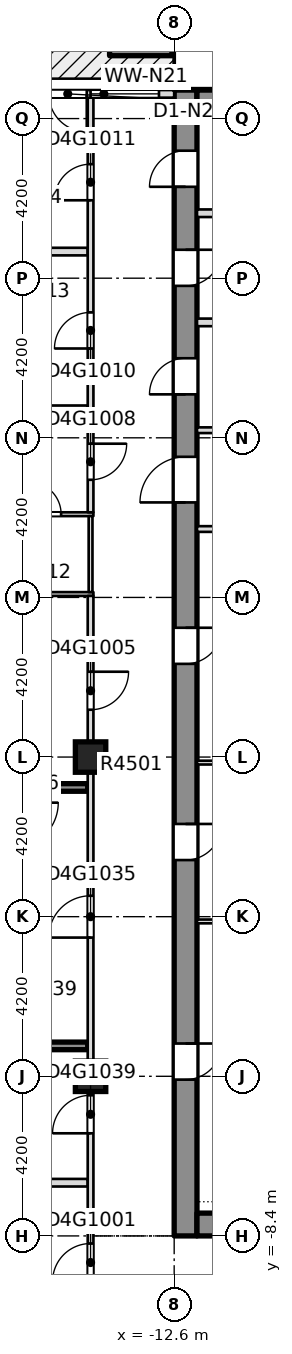
"""IFC4 building model, lengths in metres.
Left out: names, types, materials, properties, quantities, classifications, styles, units other than length and angle.
Written with IfcOpenShell. Run it as: python <this file> out.ifc"""

import sys

from ifc_helpers import new_model, si_unit, direction, frame, frame_2d, origin, origin_2d, place, context, subcontext, project, spatial, rectangle, extrude, element, fill, save


model = new_model("IFC4")
c1 = context("Model", 3, precision=1e-05, world=origin(), true_north=direction((0.0, 1.0)))
c2 = subcontext(c1, "Body", "Model", "MODEL_VIEW")
j1 = project(units=[si_unit("LENGTHUNIT", "METRE"), si_unit("PLANEANGLEUNIT", "RADIAN")], contexts=[c1])
p1 = place(None, origin())
s1 = spatial("IfcSite", under=j1, at=p1, CompositionType="ELEMENT")
p2 = place(p1, origin())
s2 = spatial("IfcBuilding", under=s1, at=p2, CompositionType="ELEMENT")
p3 = place(p2, frame((0.0, 0.0, 175.55)))
s3 = spatial("IfcBuildingStorey", under=s2, at=p3, CompositionType="ELEMENT", Elevation=175.55)
p4 = place(p3, frame((-12.3, -8.4, -0.4), z_axis=(0.0, 0.0, 1.0), x_axis=(0.0, 1.0, 0.0)))
e1 = element("IfcWall", 1, at=p4, inside=s3, PredefinedType="SHEAR", context=c2, shape_type="SweptSolid", body=[
    extrude(rectangle(XDim=30.15, YDim=0.6, at=frame_2d((15.075, 0.0))), origin(), (0.0, 0.0, 1.0), 3.45),
])
p5 = place(p4, frame((4.113, 0.0, 0.4)))
e2 = element("IfcOpeningElement", 2, at=p5, cuts=e1, PredefinedType="OPENING", context=c2, shape_type="SweptSolid", body=[
    extrude(rectangle(XDim=0.95, YDim=2.1, at=frame_2d((0.475, 1.05))), frame((0.0, 0.31, 0.0), z_axis=(0.0, -1.0, 0.0), x_axis=(1.0, 0.0, 0.0)), (0.0, 0.0, 1.0), 0.62),
])
p6 = place(p4, frame((9.89, 0.0, 0.4)))
e3 = element("IfcOpeningElement", 3, at=p6, cuts=e1, PredefinedType="OPENING", context=c2, shape_type="SweptSolid", body=[
    extrude(rectangle(XDim=0.95, YDim=2.1, at=frame_2d((0.475, 1.05))), frame((0.0, 0.31, 0.0), z_axis=(0.0, -1.0, 0.0), x_axis=(1.0, 0.0, 0.0)), (0.0, 0.0, 1.0), 0.62),
])
p7 = place(p4, frame((15.052, 0.0, 0.4)))
e4 = element("IfcOpeningElement", 4, at=p7, cuts=e1, PredefinedType="OPENING", context=c2, shape_type="SweptSolid", body=[
    extrude(rectangle(XDim=0.95, YDim=2.1, at=frame_2d((0.475, 1.05))), frame((0.0, 0.31, 0.0), z_axis=(0.0, -1.0, 0.0), x_axis=(1.0, 0.0, 0.0)), (0.0, 0.0, 1.0), 0.62),
])
p8 = place(p4, frame((22.144, 0.0, 0.4)))
e5 = element("IfcOpeningElement", 5, at=p8, cuts=e1, PredefinedType="OPENING", context=c2, shape_type="SweptSolid", body=[
    extrude(rectangle(XDim=0.95, YDim=2.1, at=frame_2d((0.475, 1.05))), frame((0.0, 0.31, 0.0), z_axis=(0.0, -1.0, 0.0), x_axis=(1.0, 0.0, 0.0)), (0.0, 0.0, 1.0), 0.62),
])
p9 = place(p4, frame((24.998, 0.0, 0.4)))
e6 = element("IfcOpeningElement", 6, at=p9, cuts=e1, PredefinedType="OPENING", context=c2, shape_type="SweptSolid", body=[
    extrude(rectangle(XDim=0.95, YDim=2.1, at=frame_2d((0.475, 1.05))), frame((0.0, 0.31, 0.0), z_axis=(0.0, -1.0, 0.0), x_axis=(1.0, 0.0, 0.0)), (0.0, 0.0, 1.0), 0.62),
])
p10 = place(p4, frame((27.605, 0.0, 0.4)))
e7 = element("IfcOpeningElement", 7, at=p10, cuts=e1, PredefinedType="OPENING", context=c2, shape_type="SweptSolid", body=[
    extrude(rectangle(XDim=0.95, YDim=2.1, at=frame_2d((0.475, 1.05))), frame((0.0, 0.31, 0.0), z_axis=(0.0, -1.0, 0.0), x_axis=(1.0, 0.0, 0.0)), (0.0, 0.0, 1.0), 0.62),
])
p11 = place(p4, frame((19.3, 0.0, 0.4)))
e8 = element("IfcOpeningElement", 8, at=p11, cuts=e1, PredefinedType="OPENING", context=c2, shape_type="SweptSolid", body=[
    extrude(rectangle(XDim=1.2, YDim=2.1, at=frame_2d((0.6, 1.05))), frame((0.0, 0.31, 0.0), z_axis=(0.0, -1.0, 0.0), x_axis=(1.0, 0.0, 0.0)), (0.0, 0.0, 1.0), 0.62),
])
p12 = place(p3, frame((-12.0, -8.1, -0.4), z_axis=(0.0, 0.0, 1.0), x_axis=(1.0, 0.0, 0.0)))
e9 = element("IfcWall", 9, at=p12, inside=s3, PredefinedType="SHEAR", context=c2, shape_type="SweptSolid", body=[
    extrude(rectangle(XDim=24.0, YDim=0.6, at=frame_2d((12.0, 0.0))), origin(), (0.0, 0.0, 1.0), 3.45),
])
p13 = place(p12, frame((7.25, 0.0, 0.4)))
e10 = element("IfcOpeningElement", 10, at=p13, cuts=e9, PredefinedType="OPENING", context=c2, shape_type="SweptSolid", body=[
    extrude(rectangle(XDim=1.8, YDim=2.1, at=frame_2d((0.9, 1.05))), frame((0.0, 0.31, 0.0), z_axis=(0.0, -1.0, 0.0), x_axis=(1.0, 0.0, 0.0)), (0.0, 0.0, 1.0), 0.62),
])
p14 = place(p12, frame((14.95, 0.0, 0.4)))
e11 = element("IfcOpeningElement", 11, at=p14, cuts=e9, PredefinedType="OPENING", context=c2, shape_type="SweptSolid", body=[
    extrude(rectangle(XDim=1.8, YDim=2.1, at=frame_2d((0.9, 1.05))), frame((0.0, 0.31, 0.0), z_axis=(0.0, -1.0, 0.0), x_axis=(1.0, 0.0, 0.0)), (0.0, 0.0, 1.0), 0.62),
])
p15 = place(p3, frame((-12.0, 21.45, -0.4), z_axis=(0.0, 0.0, 1.0), x_axis=(1.0, 0.0, 0.0)))
e12 = element("IfcWall", 12, at=p15, inside=s3, PredefinedType="SHEAR", context=c2, shape_type="SweptSolid", body=[
    extrude(rectangle(XDim=24.0, YDim=0.6, at=frame_2d((12.0, 0.0))), origin(), (0.0, 0.0, 1.0), 3.45),
])
for number, where, z_axis, x_axis in (
    (13, (-14.8, -4.2, -0.4), (0.0, 0.0, 1.0), (1.0, 0.0, 0.0)),
    (14, (-14.8, 4.2, -0.4), (0.0, 0.0, 1.0), (1.0, 0.0, 0.0)),
):
    element("IfcColumn", number, at=place(p3, frame(where, z_axis=z_axis, x_axis=x_axis)), inside=s3, PredefinedType="COLUMN", context=c2, shape_type="SweptSolid", body=[
        extrude(rectangle(XDim=0.8, YDim=0.8, at=origin_2d()), origin(), (0.0, 0.0, 1.0), 3.45),
    ])
p16 = place(p3, frame((-25.75, -7.0, 0.0), z_axis=(0.0, 0.0, 1.0), x_axis=(1.0, 0.0, 0.0)))
e15 = element("IfcWall", 15, at=p16, inside=s3, PredefinedType="PARTITIONING", context=c2, shape_type="SweptSolid", body=[
    extrude(rectangle(XDim=10.875, YDim=0.2, at=frame_2d((5.438, 0.0))), origin(), (0.0, 0.0, 1.0), 3.05),
])
p17 = place(p3, frame((-20.4, -3.4, 0.0), z_axis=(0.0, 0.0, 1.0), x_axis=(1.0, 0.0, 0.0)))
e16 = element("IfcWall", 16, at=p17, inside=s3, PredefinedType="SOLIDWALL", context=c2, shape_type="SweptSolid", body=[
    extrude(rectangle(XDim=5.525, YDim=0.2, at=frame_2d((2.762, 0.0))), origin(), (0.0, 0.0, 1.0), 3.05),
])
p18 = place(p3, frame((-20.45, 3.4, 0.0), z_axis=(0.0, 0.0, 1.0), x_axis=(1.0, 0.0, 0.0)))
e17 = element("IfcWall", 17, at=p18, inside=s3, PredefinedType="SOLIDWALL", context=c2, shape_type="SweptSolid", body=[
    extrude(rectangle(XDim=5.575, YDim=0.2, at=frame_2d((2.788, 0.0))), origin(), (0.0, 0.0, 1.0), 3.05),
])
p19 = place(p3, frame((-17.25, 8.49, 0.0), z_axis=(0.0, 0.0, 1.0), x_axis=(1.0, 0.0, 0.0)))
e18 = element("IfcWall", 18, at=p19, inside=s3, PredefinedType="PARTITIONING", context=c2, shape_type="SweptSolid", body=[
    extrude(rectangle(XDim=2.525, YDim=0.1, at=frame_2d((1.262, 0.0))), origin(), (0.0, 0.0, 1.0), 3.05),
])
p20 = place(p3, frame((-17.25, 10.59, 0.0), z_axis=(0.0, 0.0, 1.0), x_axis=(1.0, 0.0, 0.0)))
e19 = element("IfcWall", 19, at=p20, inside=s3, PredefinedType="PARTITIONING", context=c2, shape_type="SweptSolid", body=[
    extrude(rectangle(XDim=2.525, YDim=0.1, at=frame_2d((1.262, 0.0))), origin(), (0.0, 0.0, 1.0), 3.05),
])
p21 = place(p20, frame((0.825, 0.0, 0.0)))
e20 = element("IfcOpeningElement", 20, at=p21, cuts=e19, PredefinedType="OPENING", context=c2, shape_type="SweptSolid", body=[
    extrude(rectangle(XDim=0.85, YDim=2.1, at=frame_2d((0.425, 1.05))), frame((0.0, 0.06, 0.0), z_axis=(0.0, -1.0, 0.0), x_axis=(1.0, 0.0, 0.0)), (0.0, 0.0, 1.0), 0.12),
])
for number, where, z_axis, x_axis in (
    (21, (-17.35, 13.35, 0.0), (0.0, 0.0, 1.0), (1.0, 0.0, 0.0)),
    (22, (-17.35, 17.5, 0.0), (0.0, 0.0, 1.0), (1.0, 0.0, 0.0)),
):
    element("IfcWall", number, at=place(p3, frame(where, z_axis=z_axis, x_axis=x_axis)), inside=s3, PredefinedType="PARTITIONING", context=c2, shape_type="SweptSolid", body=[
        extrude(rectangle(XDim=2.475, YDim=0.2, at=frame_2d((1.238, 0.0))), origin(), (0.0, 0.0, 1.0), 3.05),
    ])
p22 = place(p3, frame((-14.8, -10.525, 0.0), z_axis=(0.0, 0.0, 1.0), x_axis=(0.0, 1.0, 0.0)))
e23 = element("IfcWall", 23, at=p22, inside=s3, PredefinedType="PARTITIONING", context=c2, shape_type="SweptSolid", body=[
    extrude(rectangle(XDim=18.965, YDim=0.15, at=frame_2d((9.482, 0.0))), origin(), (0.0, 0.0, 1.0), 3.05),
])
p23 = place(p22, frame((0.925, 0.0, 0.0)))
e24 = element("IfcOpeningElement", 24, at=p23, cuts=e23, PredefinedType="OPENING", context=c2, shape_type="SweptSolid", body=[
    extrude(rectangle(XDim=1.0, YDim=2.1, at=frame_2d((0.5, 1.05))), frame((0.0, 0.085, 0.0), z_axis=(0.0, -1.0, 0.0), x_axis=(1.0, 0.0, 0.0)), (0.0, 0.0, 1.0), 0.17),
])
p24 = place(p22, frame((15.97, 0.0, 0.0)))
e25 = element("IfcOpeningElement", 25, at=p24, cuts=e23, PredefinedType="OPENING", context=c2, shape_type="SweptSolid", body=[
    extrude(rectangle(XDim=1.0, YDim=2.1, at=frame_2d((0.5, 1.05))), frame((0.0, 0.085, 0.0), z_axis=(0.0, -1.0, 0.0), x_axis=(1.0, 0.0, 0.0)), (0.0, 0.0, 1.0), 0.17),
])
p25 = place(p22, frame((9.975, 0.0, 0.0)))
e26 = element("IfcOpeningElement", 26, at=p25, cuts=e23, PredefinedType="OPENING", context=c2, shape_type="SweptSolid", body=[
    extrude(rectangle(XDim=1.1, YDim=2.1, at=frame_2d((0.55, 1.05))), frame((0.0, 0.085, 0.0), z_axis=(0.0, -1.0, 0.0), x_axis=(1.0, 0.0, 0.0)), (0.0, 0.0, 1.0), 0.17),
])
p26 = place(p22, frame((4.825, 0.0, 0.0)))
e27 = element("IfcOpeningElement", 27, at=p26, cuts=e23, PredefinedType="OPENING", context=c2, shape_type="SweptSolid", body=[
    extrude(rectangle(XDim=1.0, YDim=2.1, at=frame_2d((0.5, 1.05))), frame((0.0, 0.085, 0.0), z_axis=(0.0, -1.0, 0.0), x_axis=(1.0, 0.0, 0.0)), (0.0, 0.0, 1.0), 0.17),
])
p27 = place(p3, frame((-14.8, 8.54, 0.0), z_axis=(0.0, 0.0, 1.0), x_axis=(0.0, 1.0, 0.0)))
e28 = element("IfcWall", 28, at=p27, inside=s3, PredefinedType="PARTITIONING", context=c2, shape_type="SweptSolid", body=[
    extrude(rectangle(XDim=2.0, YDim=0.1, at=frame_2d((1.0, 0.0))), origin(), (0.0, 0.0, 1.0), 3.05),
])
p28 = place(p3, frame((-14.8, 10.64, 0.0), z_axis=(0.0, 0.0, 1.0), x_axis=(0.0, 1.0, 0.0)))
e29 = element("IfcWall", 29, at=p28, inside=s3, PredefinedType="PARTITIONING", context=c2, shape_type="SweptSolid", body=[
    extrude(rectangle(XDim=10.91, YDim=0.15, at=frame_2d((5.455, 0.0))), origin(), (0.0, 0.0, 1.0), 3.05),
])
p29 = place(p28, frame((0.855, 0.0, 0.0)))
e30 = element("IfcOpeningElement", 30, at=p29, cuts=e29, PredefinedType="OPENING", context=c2, shape_type="SweptSolid", body=[
    extrude(rectangle(XDim=0.95, YDim=2.1, at=frame_2d((0.475, 1.05))), frame((0.0, 0.085, 0.0), z_axis=(0.0, -1.0, 0.0), x_axis=(1.0, 0.0, 0.0)), (0.0, 0.0, 1.0), 0.17),
])
p30 = place(p28, frame((4.31, 0.0, 0.0)))
e31 = element("IfcOpeningElement", 31, at=p30, cuts=e29, PredefinedType="OPENING", context=c2, shape_type="SweptSolid", body=[
    extrude(rectangle(XDim=0.95, YDim=2.1, at=frame_2d((0.475, 1.05))), frame((0.0, 0.085, 0.0), z_axis=(0.0, -1.0, 0.0), x_axis=(1.0, 0.0, 0.0)), (0.0, 0.0, 1.0), 0.17),
])
p31 = place(p28, frame((8.21, 0.0, 0.0)))
e32 = element("IfcOpeningElement", 32, at=p31, cuts=e29, PredefinedType="OPENING", context=c2, shape_type="SweptSolid", body=[
    extrude(rectangle(XDim=0.95, YDim=2.1, at=frame_2d((0.475, 1.05))), frame((0.0, 0.085, 0.0), z_axis=(0.0, -1.0, 0.0), x_axis=(1.0, 0.0, 0.0)), (0.0, 0.0, 1.0), 0.17),
])
p32 = place(p3, frame((-12.6, 21.65, 0.0), z_axis=(0.0, 0.0, 1.0), x_axis=(-1.0, 0.0, 0.0)))
e33 = element("IfcWall", 33, at=p32, inside=s3, PredefinedType="STANDARD", context=c2, shape_type="SweptSolid", body=[
    extrude(rectangle(XDim=3.7, YDim=0.2, at=frame_2d((1.85, 0.0))), origin(), (0.0, 0.0, 1.0), 3.05),
])
p33 = place(p32, frame((0.4, 0.0, 0.2)))
e34 = element("IfcOpeningElement", 34, at=p33, cuts=e33, PredefinedType="OPENING", context=c2, shape_type="SweptSolid", body=[
    extrude(rectangle(XDim=1.8, YDim=2.65, at=frame_2d((0.9, 1.325))), frame((0.0, 0.11, 0.0), z_axis=(0.0, -1.0, 0.0), x_axis=(1.0, 0.0, 0.0)), (0.0, 0.0, 1.0), 0.22),
])
p34 = place(p32, frame((2.3, 0.0, 0.0)))
e35 = element("IfcOpeningElement", 35, at=p34, cuts=e33, PredefinedType="OPENING", context=c2, shape_type="SweptSolid", body=[
    extrude(rectangle(XDim=1.0, YDim=2.4, at=frame_2d((0.5, 1.2))), frame((0.0, 0.11, 0.0), z_axis=(0.0, -1.0, 0.0), x_axis=(1.0, 0.0, 0.0)), (0.0, 0.0, 1.0), 0.22),
])
p35 = place(p3, frame((-12.66, 22.954, -0.04), z_axis=(0.0, 0.0, 1.0), x_axis=(-1.0, 0.0, 0.0)))
e36 = element("IfcWall", 36, at=p35, inside=s3, PredefinedType="USERDEFINED", context=c2, shape_type="SweptSolid", body=[
    extrude(rectangle(XDim=1.64, YDim=0.6, at=frame_2d((0.82, 0.0))), origin(), (0.0, 0.0, 1.0), 1.2),
])
for number, where, z_axis, x_axis in (
    (37, (-11.999, -0.125, 0.0), (0.0, 0.0, 1.0), (1.0, 0.0, 0.0)),
    (38, (-11.999, 4.054, 0.0), (0.0, 0.0, 1.0), (1.0, 0.0, 0.0)),
):
    element("IfcWall", number, at=place(p3, frame(where, z_axis=z_axis, x_axis=x_axis)), inside=s3, PredefinedType="PARTITIONING", context=c2, shape_type="SweptSolid", body=[
        extrude(rectangle(XDim=3.298, YDim=0.1, at=frame_2d((1.649, 0.0))), origin(), (0.0, 0.0, 1.0), 3.05),
    ])
for number, where, z_axis, x_axis in (
    (39, (-11.999, 10.2, 0.0), (0.0, 0.0, 1.0), (1.0, 0.0, 0.0)),
    (40, (-11.999, 12.8, 0.0), (0.0, 0.0, 1.0), (1.0, 0.0, 0.0)),
):
    element("IfcWall", number, at=place(p3, frame(where, z_axis=z_axis, x_axis=x_axis)), inside=s3, PredefinedType="PARTITIONING", context=c2, shape_type="SweptSolid", body=[
        extrude(rectangle(XDim=3.298, YDim=0.15, at=frame_2d((1.649, 0.0))), origin(), (0.0, 0.0, 1.0), 3.05),
    ])
for number, where, z_axis, x_axis in (
    (41, (-11.999, 15.637, 0.0), (0.0, 0.0, 1.0), (1.0, 0.0, 0.0)),
    (42, (-11.999, 18.509, 0.0), (0.0, 0.0, 1.0), (1.0, 0.0, 0.0)),
):
    element("IfcWall", number, at=place(p3, frame(where, z_axis=z_axis, x_axis=x_axis)), inside=s3, PredefinedType="PARTITIONING", context=c2, shape_type="SweptSolid", body=[
        extrude(rectangle(XDim=3.298, YDim=0.2, at=frame_2d((1.649, 0.0))), origin(), (0.0, 0.0, 1.0), 3.05),
    ])
p36 = place(p23, origin())
e43 = element("IfcDoor", 43, at=p36, inside=s3, OperationType="SINGLE_SWING_LEFT", PredefinedType="DOOR", context=c2, shape_type="SweptSolid", body=[
    extrude(rectangle(XDim=1.0, YDim=2.1, at=frame_2d((0.5, 1.05))), frame((0.0, 0.025, 0.0), z_axis=(0.0, -1.0, 0.0), x_axis=(1.0, 0.0, 0.0)), (0.0, 0.0, 1.0), 0.05),
])
fill(e24, e43)
p37 = place(p24, origin())
e44 = element("IfcDoor", 44, at=p37, inside=s3, OperationType="SINGLE_SWING_RIGHT", PredefinedType="DOOR", context=c2, shape_type="SweptSolid", body=[
    extrude(rectangle(XDim=1.0, YDim=2.1, at=frame_2d((0.5, 1.05))), frame((0.0, 0.025, 0.0), z_axis=(0.0, -1.0, 0.0), x_axis=(1.0, 0.0, 0.0)), (0.0, 0.0, 1.0), 0.05),
])
fill(e25, e44)
p38 = place(p29, origin())
e45 = element("IfcDoor", 45, at=p38, inside=s3, OperationType="SINGLE_SWING_LEFT", PredefinedType="DOOR", context=c2, shape_type="SweptSolid", body=[
    extrude(rectangle(XDim=0.95, YDim=2.1, at=frame_2d((0.475, 1.05))), frame((0.0, 0.025, 0.0), z_axis=(0.0, -1.0, 0.0), x_axis=(1.0, 0.0, 0.0)), (0.0, 0.0, 1.0), 0.05),
])
fill(e30, e45)
p39 = place(p21, origin())
e46 = element("IfcDoor", 46, at=p39, inside=s3, OperationType="SINGLE_SWING_RIGHT", PredefinedType="DOOR", context=c2, shape_type="SweptSolid", body=[
    extrude(rectangle(XDim=0.85, YDim=2.1, at=frame_2d((0.425, 1.05))), frame((0.0, 0.025, 0.0), z_axis=(0.0, -1.0, 0.0), x_axis=(1.0, 0.0, 0.0)), (0.0, 0.0, 1.0), 0.05),
])
fill(e20, e46)
p40 = place(p30, origin())
e47 = element("IfcDoor", 47, at=p40, inside=s3, OperationType="SINGLE_SWING_LEFT", PredefinedType="DOOR", context=c2, shape_type="SweptSolid", body=[
    extrude(rectangle(XDim=0.95, YDim=2.1, at=frame_2d((0.475, 1.05))), frame((0.0, 0.025, 0.0), z_axis=(0.0, -1.0, 0.0), x_axis=(1.0, 0.0, 0.0)), (0.0, 0.0, 1.0), 0.05),
])
fill(e31, e47)
p41 = place(p31, origin())
e48 = element("IfcDoor", 48, at=p41, inside=s3, OperationType="SINGLE_SWING_RIGHT", PredefinedType="DOOR", context=c2, shape_type="SweptSolid", body=[
    extrude(rectangle(XDim=0.95, YDim=2.1, at=frame_2d((0.475, 1.05))), frame((0.0, 0.025, 0.0), z_axis=(0.0, -1.0, 0.0), x_axis=(1.0, 0.0, 0.0)), (0.0, 0.0, 1.0), 0.05),
])
fill(e32, e48)
p42 = place(p25, origin())
e49 = element("IfcDoor", 49, at=p42, inside=s3, OperationType="SINGLE_SWING_RIGHT", PredefinedType="DOOR", context=c2, shape_type="SweptSolid", body=[
    extrude(rectangle(XDim=1.1, YDim=2.1, at=frame_2d((0.55, 1.05))), frame((0.0, 0.025, 0.0), z_axis=(0.0, -1.0, 0.0), x_axis=(1.0, 0.0, 0.0)), (0.0, 0.0, 1.0), 0.05),
])
fill(e26, e49)
p43 = place(p26, origin())
e50 = element("IfcDoor", 50, at=p43, inside=s3, OperationType="SINGLE_SWING_RIGHT", PredefinedType="DOOR", context=c2, shape_type="SweptSolid", body=[
    extrude(rectangle(XDim=1.0, YDim=2.1, at=frame_2d((0.5, 1.05))), frame((0.0, 0.025, 0.0), z_axis=(0.0, -1.0, 0.0), x_axis=(1.0, 0.0, 0.0)), (0.0, 0.0, 1.0), 0.05),
])
fill(e27, e50)
p44 = place(p33, origin())
e51 = element("IfcWindow", 51, at=p44, inside=s3, PartitioningType="SINGLE_PANEL", PredefinedType="WINDOW", context=c2, shape_type="SweptSolid", body=[
    extrude(rectangle(XDim=1.8, YDim=2.65, at=frame_2d((0.9, 1.325))), frame((0.0, 0.03, 0.0), z_axis=(0.0, -1.0, 0.0), x_axis=(1.0, 0.0, 0.0)), (0.0, 0.0, 1.0), 0.06),
])
fill(e34, e51)
p45 = place(p34, origin())
e52 = element("IfcDoor", 52, at=p45, inside=s3, OperationType="SINGLE_SWING_LEFT", PredefinedType="DOOR", context=c2, shape_type="SweptSolid", body=[
    extrude(rectangle(XDim=1.0, YDim=2.4, at=frame_2d((0.5, 1.2))), frame((0.0, 0.025, 0.0), z_axis=(0.0, -1.0, 0.0), x_axis=(1.0, 0.0, 0.0)), (0.0, 0.0, 1.0), 0.05),
])
fill(e35, e52)
p46 = place(p5, origin())
e53 = element("IfcDoor", 53, at=p46, inside=s3, OperationType="SINGLE_SWING_LEFT", PredefinedType="DOOR", context=c2, shape_type="SweptSolid", body=[
    extrude(rectangle(XDim=0.95, YDim=2.1, at=frame_2d((0.475, 1.05))), frame((0.0, 0.025, 0.0), z_axis=(0.0, -1.0, 0.0), x_axis=(1.0, 0.0, 0.0)), (0.0, 0.0, 1.0), 0.05),
])
fill(e2, e53)
p47 = place(p6, origin())
e54 = element("IfcDoor", 54, at=p47, inside=s3, OperationType="SINGLE_SWING_LEFT", PredefinedType="DOOR", context=c2, shape_type="SweptSolid", body=[
    extrude(rectangle(XDim=0.95, YDim=2.1, at=frame_2d((0.475, 1.05))), frame((0.0, 0.025, 0.0), z_axis=(0.0, -1.0, 0.0), x_axis=(1.0, 0.0, 0.0)), (0.0, 0.0, 1.0), 0.05),
])
fill(e3, e54)
p48 = place(p7, origin())
e55 = element("IfcDoor", 55, at=p48, inside=s3, OperationType="SINGLE_SWING_LEFT", PredefinedType="DOOR", context=c2, shape_type="SweptSolid", body=[
    extrude(rectangle(XDim=0.95, YDim=2.1, at=frame_2d((0.475, 1.05))), frame((0.0, 0.025, 0.0), z_axis=(0.0, -1.0, 0.0), x_axis=(1.0, 0.0, 0.0)), (0.0, 0.0, 1.0), 0.05),
])
fill(e4, e55)
p49 = place(p8, origin())
e56 = element("IfcDoor", 56, at=p49, inside=s3, OperationType="SINGLE_SWING_LEFT", PredefinedType="DOOR", context=c2, shape_type="SweptSolid", body=[
    extrude(rectangle(XDim=0.95, YDim=2.1, at=frame_2d((0.475, 1.05))), frame((0.0, 0.025, 0.0), z_axis=(0.0, -1.0, 0.0), x_axis=(1.0, 0.0, 0.0)), (0.0, 0.0, 1.0), 0.05),
])
fill(e5, e56)
p50 = place(p9, origin())
e57 = element("IfcDoor", 57, at=p50, inside=s3, OperationType="SINGLE_SWING_LEFT", PredefinedType="DOOR", context=c2, shape_type="SweptSolid", body=[
    extrude(rectangle(XDim=0.95, YDim=2.1, at=frame_2d((0.475, 1.05))), frame((0.0, 0.025, 0.0), z_axis=(0.0, -1.0, 0.0), x_axis=(1.0, 0.0, 0.0)), (0.0, 0.0, 1.0), 0.05),
])
fill(e6, e57)
p51 = place(p10, origin())
e58 = element("IfcDoor", 58, at=p51, inside=s3, OperationType="SINGLE_SWING_LEFT", PredefinedType="DOOR", context=c2, shape_type="SweptSolid", body=[
    extrude(rectangle(XDim=0.95, YDim=2.1, at=frame_2d((0.475, 1.05))), frame((0.0, 0.025, 0.0), z_axis=(0.0, -1.0, 0.0), x_axis=(1.0, 0.0, 0.0)), (0.0, 0.0, 1.0), 0.05),
])
fill(e7, e58)
p52 = place(p11, origin())
e59 = element("IfcDoor", 59, at=p52, inside=s3, OperationType="SINGLE_SWING_LEFT", PredefinedType="DOOR", context=c2, shape_type="SweptSolid", body=[
    extrude(rectangle(XDim=1.2, YDim=2.1, at=frame_2d((0.6, 1.05))), frame((0.0, 0.025, 0.0), z_axis=(0.0, -1.0, 0.0), x_axis=(1.0, 0.0, 0.0)), (0.0, 0.0, 1.0), 0.05),
])
fill(e8, e59)
save(model, sys.argv[1])
